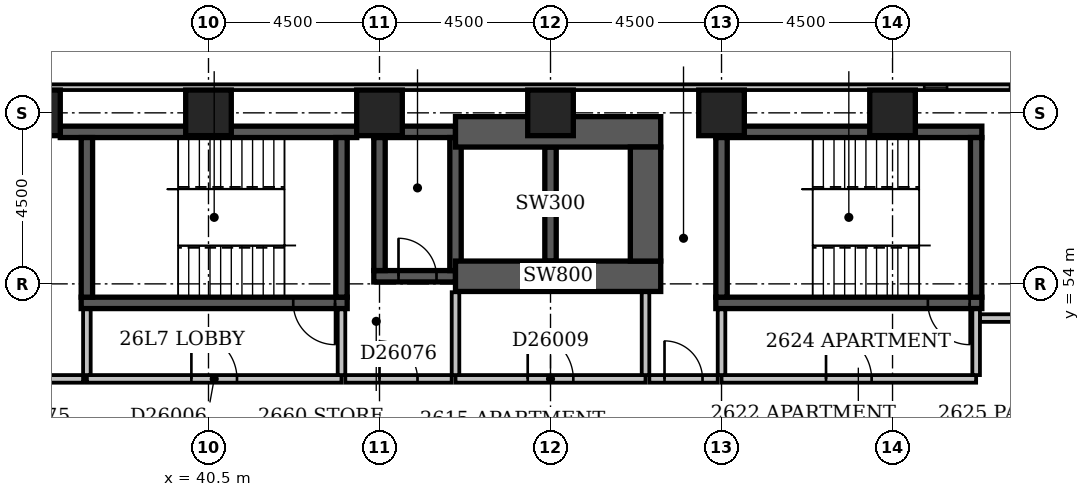
"""IFC4 building model, lengths in metres.
Left out: names, types, materials, properties, quantities, classifications, styles, units other than length and angle.
Written with IfcOpenShell. Run it as: python <this file> out.ifc"""

import sys

from ifc_helpers import new_model, si_unit, direction, frame, frame_2d, origin, origin_2d, place, context, subcontext, project, spatial, rectangle, extrude, element, fill, save


model = new_model("IFC4")
c1 = context("Model", 3, precision=1e-05, world=origin(), true_north=direction((0.0, 1.0)))
c2 = subcontext(c1, "Body", "Model", "MODEL_VIEW")
j1 = project(units=[si_unit("LENGTHUNIT", "METRE"), si_unit("PLANEANGLEUNIT", "RADIAN")], contexts=[c1])
p1 = place(None, origin())
s1 = spatial("IfcSite", under=j1, at=p1, CompositionType="ELEMENT")
p2 = place(p1, origin())
s2 = spatial("IfcBuilding", under=s1, at=p2, CompositionType="ELEMENT")
p3 = place(p2, frame((0.0, 0.0, 104.6)))
s3 = spatial("IfcBuildingStorey", under=s2, at=p3, CompositionType="ELEMENT", Elevation=104.6)
p4 = place(p3, frame((36.6, 58.0, -0.3), z_axis=(0.0, 0.0, 1.0), x_axis=(1.0, 0.0, 0.0)))
e1 = element("IfcWall", 1, at=p4, inside=s3, PredefinedType="SHEAR", context=c2, shape_type="SweptSolid", body=[
    extrude(rectangle(XDim=7.8, YDim=0.3, at=frame_2d((3.9, 0.0))), origin(), (0.0, 0.0, 1.0), 3.45),
])
p5 = place(p3, frame((37.15, 53.5, -0.3), z_axis=(0.0, 0.0, 1.0), x_axis=(1.0, 0.0, 0.0)))
e2 = element("IfcWall", 2, at=p5, inside=s3, PredefinedType="SHEAR", context=c2, shape_type="SweptSolid", body=[
    extrude(rectangle(XDim=7.0, YDim=0.3, at=frame_2d((3.5, 0.0))), origin(), (0.0, 0.0, 1.0), 3.45),
])
p6 = place(p5, frame((5.58, 0.0, 0.3)))
e3 = element("IfcOpeningElement", 3, at=p6, cuts=e2, PredefinedType="OPENING", context=c2, shape_type="SweptSolid", body=[
    extrude(rectangle(XDim=1.1, YDim=2.1, at=frame_2d((0.55, 1.05))), frame((0.0, 0.162, 0.0), z_axis=(0.0, -1.0, 0.0), x_axis=(1.0, 0.0, 0.0)), (0.0, 0.0, 1.0), 0.324),
])
for number, where, z_axis, x_axis in (
    (4, (37.3, 53.65, -0.3), (0.0, 0.0, 1.0), (0.0, 1.0, 0.0)),
    (5, (44.0, 53.65, -0.3), (0.0, 0.0, 1.0), (0.0, 1.0, 0.0)),
):
    element("IfcWall", number, at=place(p3, frame(where, z_axis=z_axis, x_axis=x_axis)), inside=s3, PredefinedType="SHEAR", context=c2, shape_type="SweptSolid", body=[
        extrude(rectangle(XDim=4.2, YDim=0.3, at=frame_2d((2.1, 0.0))), origin(), (0.0, 0.0, 1.0), 3.45),
    ])
p7 = place(p3, frame((44.85, 54.2, -0.3), z_axis=(0.0, 0.0, 1.0), x_axis=(1.0, 0.0, 0.0)))
e6 = element("IfcWall", 6, at=p7, inside=s3, PredefinedType="SHEAR", context=c2, shape_type="SweptSolid", body=[
    extrude(rectangle(XDim=2.15, YDim=0.3, at=frame_2d((1.075, 0.0))), origin(), (0.0, 0.0, 1.0), 3.45),
])
p8 = place(p7, frame((0.65, 0.0, 0.3)))
e7 = element("IfcOpeningElement", 7, at=p8, cuts=e6, PredefinedType="OPENING", context=c2, shape_type="SweptSolid", body=[
    extrude(rectangle(XDim=1.0, YDim=2.1, at=frame_2d((0.5, 1.05))), frame((0.0, 0.162, 0.0), z_axis=(0.0, -1.0, 0.0), x_axis=(1.0, 0.0, 0.0)), (0.0, 0.0, 1.0), 0.324),
])
p9 = place(p3, frame((44.85, 58.0, -0.3), z_axis=(0.0, 0.0, 1.0), x_axis=(1.0, 0.0, 0.0)))
e8 = element("IfcWall", 8, at=p9, inside=s3, PredefinedType="SHEAR", context=c2, shape_type="SweptSolid", body=[
    extrude(rectangle(XDim=2.15, YDim=0.3, at=frame_2d((1.075, 0.0))), origin(), (0.0, 0.0, 1.0), 3.45),
])
p10 = place(p3, frame((45.0, 54.35, -0.3), z_axis=(0.0, 0.0, 1.0), x_axis=(0.0, 1.0, 0.0)))
e9 = element("IfcWall", 9, at=p10, inside=s3, PredefinedType="SHEAR", context=c2, shape_type="SweptSolid", body=[
    extrude(rectangle(XDim=3.5, YDim=0.3, at=frame_2d((1.75, 0.0))), origin(), (0.0, 0.0, 1.0), 3.45),
])
p11 = place(p3, frame((47.0, 54.2, -0.3), z_axis=(0.0, 0.0, 1.0), x_axis=(1.0, 0.0, 0.0)))
e10 = element("IfcWall", 10, at=p11, inside=s3, PredefinedType="SHEAR", context=c2, shape_type="SweptSolid", body=[
    extrude(rectangle(XDim=5.4, YDim=0.8, at=frame_2d((2.7, 0.0))), origin(), (0.0, 0.0, 1.0), 3.45),
])
p12 = place(p3, frame((47.0, 54.35, -0.3), z_axis=(0.0, 0.0, 1.0), x_axis=(0.0, 1.0, 0.0)))
e11 = element("IfcWall", 11, at=p12, inside=s3, PredefinedType="SHEAR", context=c2, shape_type="SweptSolid", body=[
    extrude(rectangle(XDim=3.5, YDim=0.3, at=frame_2d((1.75, 0.0))), origin(), (0.0, 0.0, 1.0), 3.45),
])
p13 = place(p3, frame((47.0, 58.0, -0.3), z_axis=(0.0, 0.0, 1.0), x_axis=(1.0, 0.0, 0.0)))
e12 = element("IfcWall", 12, at=p13, inside=s3, PredefinedType="SHEAR", context=c2, shape_type="SweptSolid", body=[
    extrude(rectangle(XDim=5.4, YDim=0.8, at=frame_2d((2.7, 0.0))), origin(), (0.0, 0.0, 1.0), 3.45),
])
p14 = place(p3, frame((49.5, 54.6, -0.3), z_axis=(0.0, 0.0, 1.0), x_axis=(0.0, 1.0, 0.0)))
e13 = element("IfcWall", 13, at=p14, inside=s3, PredefinedType="SHEAR", context=c2, shape_type="SweptSolid", body=[
    extrude(rectangle(XDim=3.0, YDim=0.3, at=frame_2d((1.5, 0.0))), origin(), (0.0, 0.0, 1.0), 3.45),
])
p15 = place(p3, frame((52.0, 54.6, -0.3), z_axis=(0.0, 0.0, 1.0), x_axis=(0.0, 1.0, 0.0)))
e14 = element("IfcWall", 14, at=p15, inside=s3, PredefinedType="SHEAR", context=c2, shape_type="SweptSolid", body=[
    extrude(rectangle(XDim=3.0, YDim=0.8, at=frame_2d((1.5, 0.0))), origin(), (0.0, 0.0, 1.0), 3.45),
])
p16 = place(p3, frame((53.85, 53.5, -0.3), z_axis=(0.0, 0.0, 1.0), x_axis=(1.0, 0.0, 0.0)))
e15 = element("IfcWall", 15, at=p16, inside=s3, PredefinedType="SHEAR", context=c2, shape_type="SweptSolid", body=[
    extrude(rectangle(XDim=7.0, YDim=0.3, at=frame_2d((3.5, 0.0))), origin(), (0.0, 0.0, 1.0), 3.45),
])
p17 = place(p16, frame((5.58, 0.0, 0.3)))
e16 = element("IfcOpeningElement", 16, at=p17, cuts=e15, PredefinedType="OPENING", context=c2, shape_type="SweptSolid", body=[
    extrude(rectangle(XDim=1.1, YDim=2.1, at=frame_2d((0.55, 1.05))), frame((0.0, 0.162, 0.0), z_axis=(0.0, -1.0, 0.0), x_axis=(1.0, 0.0, 0.0)), (0.0, 0.0, 1.0), 0.324),
])
p18 = place(p3, frame((53.85, 58.0, -0.3), z_axis=(0.0, 0.0, 1.0), x_axis=(1.0, 0.0, 0.0)))
e17 = element("IfcWall", 17, at=p18, inside=s3, PredefinedType="SHEAR", context=c2, shape_type="SweptSolid", body=[
    extrude(rectangle(XDim=7.0, YDim=0.3, at=frame_2d((3.5, 0.0))), origin(), (0.0, 0.0, 1.0), 3.45),
])
for number, where, z_axis, x_axis in (
    (18, (54.0, 53.65, -0.3), (0.0, 0.0, 1.0), (0.0, 1.0, 0.0)),
    (19, (60.7, 53.65, -0.3), (0.0, 0.0, 1.0), (0.0, 1.0, 0.0)),
):
    element("IfcWall", number, at=place(p3, frame(where, z_axis=z_axis, x_axis=x_axis)), inside=s3, PredefinedType="SHEAR", context=c2, shape_type="SweptSolid", body=[
        extrude(rectangle(XDim=4.2, YDim=0.3, at=frame_2d((2.1, 0.0))), origin(), (0.0, 0.0, 1.0), 3.45),
    ])
for number, where, z_axis, x_axis in (
    (20, (36.0, 58.5, -0.3), (0.0, 0.0, 1.0), (1.0, 0.0, 0.0)),
    (21, (40.5, 58.5, -0.3), (0.0, 0.0, 1.0), (1.0, 0.0, 0.0)),
    (22, (45.0, 58.5, -0.3), (0.0, 0.0, 1.0), (1.0, 0.0, 0.0)),
    (23, (49.5, 58.5, -0.3), (0.0, 0.0, 1.0), (1.0, 0.0, 0.0)),
    (24, (54.0, 58.5, -0.3), (0.0, 0.0, 1.0), (1.0, 0.0, 0.0)),
    (25, (58.5, 58.5, -0.3), (0.0, 0.0, 1.0), (1.0, 0.0, 0.0)),
):
    element("IfcColumn", number, at=place(p3, frame(where, z_axis=z_axis, x_axis=x_axis)), inside=s3, PredefinedType="COLUMN", context=c2, shape_type="SweptSolid", body=[
        extrude(rectangle(XDim=1.2, YDim=1.2, at=origin_2d()), origin(), (0.0, 0.0, 1.0), 3.45),
    ])
p19 = place(p3, frame((68.1, 59.175, 0.0), z_axis=(0.0, 0.0, 1.0), x_axis=(-1.0, 0.0, 0.0)))
e26 = element("IfcWall", 26, at=p19, inside=s3, PredefinedType="STANDARD", context=c2, shape_type="SweptSolid", body=[
    extrude(rectangle(XDim=68.85, YDim=0.15, at=frame_2d((34.425, 0.0))), origin(), (0.0, 0.0, 1.0), 2.5),
])
p20 = place(p19, frame((1.65, 0.0, 0.6)))
e27 = element("IfcOpeningElement", 27, at=p20, cuts=e26, PredefinedType="OPENING", context=c2, shape_type="SweptSolid", body=[
    extrude(rectangle(XDim=2.4, YDim=1.8, at=frame_2d((1.2, 0.9))), frame((0.0, 0.087, 0.0), z_axis=(0.0, -1.0, 0.0), x_axis=(1.0, 0.0, 0.0)), (0.0, 0.0, 1.0), 0.174),
])
p21 = place(p19, frame((5.908, 0.0, 0.6)))
e28 = element("IfcOpeningElement", 28, at=p21, cuts=e26, PredefinedType="OPENING", context=c2, shape_type="SweptSolid", body=[
    extrude(rectangle(XDim=0.6, YDim=1.8, at=frame_2d((0.3, 0.9))), frame((0.0, 0.087, 0.0), z_axis=(0.0, -1.0, 0.0), x_axis=(1.0, 0.0, 0.0)), (0.0, 0.0, 1.0), 0.174),
])
p22 = place(p19, frame((8.166, 0.0, 0.6)))
e29 = element("IfcOpeningElement", 29, at=p22, cuts=e26, PredefinedType="OPENING", context=c2, shape_type="SweptSolid", body=[
    extrude(rectangle(XDim=0.6, YDim=1.8, at=frame_2d((0.3, 0.9))), frame((0.0, 0.087, 0.0), z_axis=(0.0, -1.0, 0.0), x_axis=(1.0, 0.0, 0.0)), (0.0, 0.0, 1.0), 0.174),
])
p23 = place(p3, frame((47.0, 51.5, 0.0), z_axis=(0.0, 0.0, 1.0), x_axis=(1.0, 0.0, 0.0)))
e30 = element("IfcWall", 30, at=p23, inside=s3, PredefinedType="PARTITIONING", context=c2, shape_type="SweptSolid", body=[
    extrude(rectangle(XDim=5.0, YDim=0.2, at=frame_2d((2.5, 0.0))), origin(), (0.0, 0.0, 1.0), 3.15),
])
p24 = place(p23, frame((1.9, 0.0, 0.0)))
e31 = element("IfcOpeningElement", 31, at=p24, cuts=e30, PredefinedType="OPENING", context=c2, shape_type="SweptSolid", body=[
    extrude(rectangle(XDim=1.2, YDim=2.1, at=frame_2d((0.6, 1.05))), frame((0.0, 0.112, 0.0), z_axis=(0.0, -1.0, 0.0), x_axis=(1.0, 0.0, 0.0)), (0.0, 0.0, 1.0), 0.224),
])
for number, where, z_axis, x_axis in (
    (32, (52.0, 51.6, 0.0), (0.0, 0.0, 1.0), (0.0, 1.0, 0.0)),
    (33, (47.0, 51.6, 0.0), (0.0, 0.0, 1.0), (0.0, 1.0, 0.0)),
):
    element("IfcWall", number, at=place(p3, frame(where, z_axis=z_axis, x_axis=x_axis)), inside=s3, PredefinedType="PARTITIONING", context=c2, shape_type="SweptSolid", body=[
        extrude(rectangle(XDim=2.18, YDim=0.2, at=frame_2d((1.09, 0.0))), origin(), (0.0, 0.0, 1.0), 3.15),
    ])
p25 = place(p3, frame((37.3, 51.5, 0.0), z_axis=(0.0, 0.0, 1.0), x_axis=(1.0, 0.0, 0.0)))
e34 = element("IfcWall", 34, at=p25, inside=s3, PredefinedType="PARTITIONING", context=c2, shape_type="SweptSolid", body=[
    extrude(rectangle(XDim=6.7, YDim=0.2, at=frame_2d((3.35, 0.0))), origin(), (0.0, 0.0, 1.0), 3.15),
])
p26 = place(p25, frame((2.75, 0.0, 0.0)))
e35 = element("IfcOpeningElement", 35, at=p26, cuts=e34, PredefinedType="OPENING", context=c2, shape_type="SweptSolid", body=[
    extrude(rectangle(XDim=1.2, YDim=2.1, at=frame_2d((0.6, 1.05))), frame((0.0, 0.112, 0.0), z_axis=(0.0, -1.0, 0.0), x_axis=(1.0, 0.0, 0.0)), (0.0, 0.0, 1.0), 0.224),
])
for number, where, z_axis, x_axis in (
    (36, (44.0, 51.6, 0.0), (0.0, 0.0, 1.0), (0.0, 1.0, 0.0)),
    (37, (37.3, 51.6, 0.0), (0.0, 0.0, 1.0), (0.0, 1.0, 0.0)),
):
    element("IfcWall", number, at=place(p3, frame(where, z_axis=z_axis, x_axis=x_axis)), inside=s3, PredefinedType="PARTITIONING", context=c2, shape_type="SweptSolid", body=[
        extrude(rectangle(XDim=1.73, YDim=0.2, at=frame_2d((0.865, 0.0))), origin(), (0.0, 0.0, 1.0), 3.15),
    ])
p27 = place(p3, frame((54.0, 51.5, 0.0), z_axis=(0.0, 0.0, 1.0), x_axis=(1.0, 0.0, 0.0)))
e38 = element("IfcWall", 38, at=p27, inside=s3, PredefinedType="PARTITIONING", context=c2, shape_type="SweptSolid", body=[
    extrude(rectangle(XDim=6.7, YDim=0.2, at=frame_2d((3.35, 0.0))), origin(), (0.0, 0.0, 1.0), 3.15),
])
p28 = place(p27, frame((2.75, 0.0, 0.0)))
e39 = element("IfcOpeningElement", 39, at=p28, cuts=e38, PredefinedType="OPENING", context=c2, shape_type="SweptSolid", body=[
    extrude(rectangle(XDim=1.2, YDim=2.1, at=frame_2d((0.6, 1.05))), frame((0.0, 0.112, 0.0), z_axis=(0.0, -1.0, 0.0), x_axis=(1.0, 0.0, 0.0)), (0.0, 0.0, 1.0), 0.224),
])
p29 = place(p3, frame((60.7, 51.6, 0.0), z_axis=(0.0, 0.0, 1.0), x_axis=(0.0, 1.0, 0.0)))
e40 = element("IfcWall", 40, at=p29, inside=s3, PredefinedType="PARTITIONING", context=c2, shape_type="SweptSolid", body=[
    extrude(rectangle(XDim=1.73, YDim=0.2, at=frame_2d((0.865, 0.0))), origin(), (0.0, 0.0, 1.0), 3.15),
])
p30 = place(p3, frame((54.0, 51.6, 0.0), z_axis=(0.0, 0.0, 1.0), x_axis=(0.0, 1.0, 0.0)))
e41 = element("IfcWall", 41, at=p30, inside=s3, PredefinedType="PARTITIONING", context=c2, shape_type="SweptSolid", body=[
    extrude(rectangle(XDim=1.73, YDim=0.2, at=frame_2d((0.865, 0.0))), origin(), (0.0, 0.0, 1.0), 2.45),
])
p31 = place(p3, frame((27.9, 51.5, 0.0), z_axis=(0.0, 0.0, 1.0), x_axis=(1.0, 0.0, 0.0)))
e42 = element("IfcWall", 42, at=p31, inside=s3, PredefinedType="PARTITIONING", context=c2, shape_type="SweptSolid", body=[
    extrude(rectangle(XDim=9.3, YDim=0.2, at=frame_2d((4.65, 0.0))), origin(), (0.0, 0.0, 1.0), 3.15),
])
p32 = place(p31, frame((1.5, 0.0, 0.0)))
e43 = element("IfcOpeningElement", 43, at=p32, cuts=e42, PredefinedType="OPENING", context=c2, shape_type="SweptSolid", body=[
    extrude(rectangle(XDim=1.0, YDim=2.1, at=frame_2d((0.5, 1.05))), frame((0.0, 0.112, 0.0), z_axis=(0.0, -1.0, 0.0), x_axis=(1.0, 0.0, 0.0)), (0.0, 0.0, 1.0), 0.224),
])
p33 = place(p31, frame((6.3, 0.0, 0.0)))
e44 = element("IfcOpeningElement", 44, at=p33, cuts=e42, PredefinedType="OPENING", context=c2, shape_type="SweptSolid", body=[
    extrude(rectangle(XDim=0.9, YDim=2.1, at=frame_2d((0.45, 1.05))), frame((0.0, 0.112, 0.0), z_axis=(0.0, -1.0, 0.0), x_axis=(1.0, 0.0, 0.0)), (0.0, 0.0, 1.0), 0.224),
])
p34 = place(p3, frame((44.1, 51.5, 0.0), z_axis=(0.0, 0.0, 1.0), x_axis=(1.0, 0.0, 0.0)))
e45 = element("IfcWall", 45, at=p34, inside=s3, PredefinedType="PARTITIONING", context=c2, shape_type="SweptSolid", body=[
    extrude(rectangle(XDim=2.8, YDim=0.2, at=frame_2d((1.4, 0.0))), origin(), (0.0, 0.0, 1.0), 3.15),
])
p35 = place(p34, frame((0.9, 0.0, 0.0)))
e46 = element("IfcOpeningElement", 46, at=p35, cuts=e45, PredefinedType="OPENING", context=c2, shape_type="SweptSolid", body=[
    extrude(rectangle(XDim=1.0, YDim=2.1, at=frame_2d((0.5, 1.05))), frame((0.0, 0.112, 0.0), z_axis=(0.0, -1.0, 0.0), x_axis=(1.0, 0.0, 0.0)), (0.0, 0.0, 1.0), 0.224),
])
p36 = place(p3, frame((52.1, 51.5, 0.0), z_axis=(0.0, 0.0, 1.0), x_axis=(1.0, 0.0, 0.0)))
e47 = element("IfcWall", 47, at=p36, inside=s3, PredefinedType="PARTITIONING", context=c2, shape_type="SweptSolid", body=[
    extrude(rectangle(XDim=1.8, YDim=0.2, at=frame_2d((0.9, 0.0))), origin(), (0.0, 0.0, 1.0), 3.15),
])
p37 = place(p36, frame((0.4, 0.0, 0.0)))
e48 = element("IfcOpeningElement", 48, at=p37, cuts=e47, PredefinedType="OPENING", context=c2, shape_type="SweptSolid", body=[
    extrude(rectangle(XDim=1.0, YDim=2.1, at=frame_2d((0.5, 1.05))), frame((0.0, 0.112, 0.0), z_axis=(0.0, -1.0, 0.0), x_axis=(1.0, 0.0, 0.0)), (0.0, 0.0, 1.0), 0.224),
])
p38 = place(p3, frame((60.8, 53.1, 0.0), z_axis=(0.0, 0.0, 1.0), x_axis=(1.0, 0.0, 0.0)))
e49 = element("IfcWall", 49, at=p38, inside=s3, PredefinedType="PARTITIONING", context=c2, shape_type="SweptSolid", body=[
    extrude(rectangle(XDim=7.3, YDim=0.2, at=frame_2d((3.65, 0.0))), origin(), (0.0, 0.0, 1.0), 3.15),
])
p39 = place(p38, frame((2.85, 0.0, 0.0)))
e50 = element("IfcOpeningElement", 50, at=p39, cuts=e49, PredefinedType="OPENING", context=c2, shape_type="SweptSolid", body=[
    extrude(rectangle(XDim=0.9, YDim=2.1, at=frame_2d((0.45, 1.05))), frame((0.0, 0.112, 0.0), z_axis=(0.0, -1.0, 0.0), x_axis=(1.0, 0.0, 0.0)), (0.0, 0.0, 1.0), 0.224),
])
p40 = place(p21, origin())
e51 = element("IfcWindow", 51, at=p40, inside=s3, PartitioningType="SINGLE_PANEL", PredefinedType="WINDOW", context=c2, shape_type="SweptSolid", body=[
    extrude(rectangle(XDim=0.6, YDim=1.8, at=frame_2d((0.3, 0.9))), frame((0.0, 0.03, 0.0), z_axis=(0.0, -1.0, 0.0), x_axis=(1.0, 0.0, 0.0)), (0.0, 0.0, 1.0), 0.06),
])
fill(e28, e51)
p41 = place(p22, origin())
e52 = element("IfcWindow", 52, at=p41, inside=s3, PartitioningType="SINGLE_PANEL", PredefinedType="WINDOW", context=c2, shape_type="SweptSolid", body=[
    extrude(rectangle(XDim=0.6, YDim=1.8, at=frame_2d((0.3, 0.9))), frame((0.0, 0.03, 0.0), z_axis=(0.0, -1.0, 0.0), x_axis=(1.0, 0.0, 0.0)), (0.0, 0.0, 1.0), 0.06),
])
fill(e29, e52)
p42 = place(p26, origin())
e53 = element("IfcDoor", 53, at=p42, inside=s3, OperationType="SINGLE_SWING_LEFT", PredefinedType="DOOR", context=c2, shape_type="SweptSolid", body=[
    extrude(rectangle(XDim=1.2, YDim=2.1, at=frame_2d((0.6, 1.05))), frame((0.0, 0.025, 0.0), z_axis=(0.0, -1.0, 0.0), x_axis=(1.0, 0.0, 0.0)), (0.0, 0.0, 1.0), 0.05),
])
fill(e35, e53)
p43 = place(p28, origin())
e54 = element("IfcDoor", 54, at=p43, inside=s3, OperationType="SINGLE_SWING_LEFT", PredefinedType="DOOR", context=c2, shape_type="SweptSolid", body=[
    extrude(rectangle(XDim=1.2, YDim=2.1, at=frame_2d((0.6, 1.05))), frame((0.0, 0.025, 0.0), z_axis=(0.0, -1.0, 0.0), x_axis=(1.0, 0.0, 0.0)), (0.0, 0.0, 1.0), 0.05),
])
fill(e39, e54)
p44 = place(p24, origin())
e55 = element("IfcDoor", 55, at=p44, inside=s3, OperationType="SINGLE_SWING_LEFT", PredefinedType="DOOR", context=c2, shape_type="SweptSolid", body=[
    extrude(rectangle(XDim=1.2, YDim=2.1, at=frame_2d((0.6, 1.05))), frame((0.0, 0.025, 0.0), z_axis=(0.0, -1.0, 0.0), x_axis=(1.0, 0.0, 0.0)), (0.0, 0.0, 1.0), 0.05),
])
fill(e31, e55)
p45 = place(p8, origin())
e56 = element("IfcDoor", 56, at=p45, inside=s3, OperationType="SINGLE_SWING_LEFT", PredefinedType="DOOR", context=c2, shape_type="SweptSolid", body=[
    extrude(rectangle(XDim=1.0, YDim=2.1, at=frame_2d((0.5, 1.05))), frame((0.0, 0.025, 0.0), z_axis=(0.0, -1.0, 0.0), x_axis=(1.0, 0.0, 0.0)), (0.0, 0.0, 1.0), 0.05),
])
fill(e7, e56)
p46 = place(p6, origin())
e57 = element("IfcDoor", 57, at=p46, inside=s3, OperationType="SINGLE_SWING_RIGHT", PredefinedType="DOOR", context=c2, shape_type="SweptSolid", body=[
    extrude(rectangle(XDim=1.1, YDim=2.1, at=frame_2d((0.55, 1.05))), frame((0.0, 0.025, 0.0), z_axis=(0.0, -1.0, 0.0), x_axis=(1.0, 0.0, 0.0)), (0.0, 0.0, 1.0), 0.05),
])
fill(e3, e57)
p47 = place(p17, origin())
e58 = element("IfcDoor", 58, at=p47, inside=s3, OperationType="SINGLE_SWING_RIGHT", PredefinedType="DOOR", context=c2, shape_type="SweptSolid", body=[
    extrude(rectangle(XDim=1.1, YDim=2.1, at=frame_2d((0.55, 1.05))), frame((0.0, 0.025, 0.0), z_axis=(0.0, -1.0, 0.0), x_axis=(1.0, 0.0, 0.0)), (0.0, 0.0, 1.0), 0.05),
])
fill(e16, e58)
p48 = place(p35, origin())
e59 = element("IfcDoor", 59, at=p48, inside=s3, OperationType="SINGLE_SWING_LEFT", PredefinedType="DOOR", context=c2, shape_type="SweptSolid", body=[
    extrude(rectangle(XDim=1.0, YDim=2.1, at=frame_2d((0.5, 1.05))), frame((0.0, 0.025, 0.0), z_axis=(0.0, -1.0, 0.0), x_axis=(1.0, 0.0, 0.0)), (0.0, 0.0, 1.0), 0.05),
])
fill(e46, e59)
p49 = place(p37, origin())
e60 = element("IfcDoor", 60, at=p49, inside=s3, OperationType="SINGLE_SWING_LEFT", PredefinedType="DOOR", context=c2, shape_type="SweptSolid", body=[
    extrude(rectangle(XDim=1.0, YDim=2.1, at=frame_2d((0.5, 1.05))), frame((0.0, 0.025, 0.0), z_axis=(0.0, -1.0, 0.0), x_axis=(1.0, 0.0, 0.0)), (0.0, 0.0, 1.0), 0.05),
])
fill(e48, e60)
save(model, sys.argv[1])
